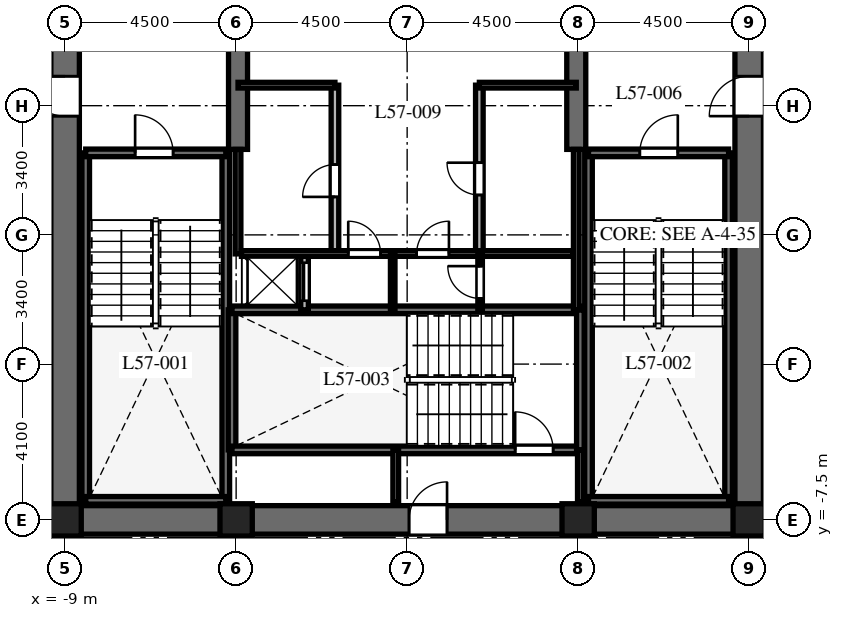
"""IFC4 building model, lengths in metres.
Left out: names, types, materials, properties, quantities, classifications, styles, units other than length and angle.
Written with IfcOpenShell. Run it as: python <this file> out.ifc"""

import sys

from ifc_helpers import new_model, si_unit, direction, frame, frame_2d, origin, origin_2d, place, context, subcontext, project, spatial, rectangle, extrude, element, fill, save


model = new_model("IFC4")
c1 = context("Model", 3, precision=1e-05, world=origin(), true_north=direction((0.0, 1.0)))
c2 = subcontext(c1, "Body", "Model", "MODEL_VIEW")
j1 = project(units=[si_unit("LENGTHUNIT", "METRE"), si_unit("PLANEANGLEUNIT", "RADIAN")], contexts=[c1])
p1 = place(None, origin())
s1 = spatial("IfcSite", under=j1, at=p1, CompositionType="ELEMENT")
p2 = place(p1, origin())
s2 = spatial("IfcBuilding", under=s1, at=p2, CompositionType="ELEMENT")
p3 = place(p2, frame((0.0, 0.0, 229.3)))
s3 = spatial("IfcBuildingStorey", under=s2, at=p3, CompositionType="ELEMENT", Elevation=229.3)
p4 = place(p3, frame((-9.375, -7.5, 0.0), z_axis=(0.0, 0.0, 1.0), x_axis=(1.0, 0.0, 0.0)))
e1 = element("IfcWall", 1, at=p4, inside=s3, PredefinedType="SHEAR", context=c2, shape_type="SweptSolid", body=[
    extrude(rectangle(XDim=18.75, YDim=0.75, at=frame_2d((9.375, 0.0))), origin(), (0.0, 0.0, 1.0), 3.8),
])
p5 = place(p4, frame((9.425, 0.0, 0.0)))
e2 = element("IfcOpeningElement", 2, at=p5, cuts=e1, PredefinedType="OPENING", context=c2, shape_type="SweptSolid", body=[
    extrude(rectangle(XDim=1.0, YDim=2.15, at=frame_2d((0.5, 1.075))), frame((0.0, 0.385, 0.0), z_axis=(0.0, -1.0, 0.0), x_axis=(1.0, 0.0, 0.0)), (0.0, 0.0, 1.0), 0.77),
])
p6 = place(p3, frame((-9.0, -7.125, 0.0), z_axis=(0.0, 0.0, 1.0), x_axis=(0.0, 1.0, 0.0)))
e3 = element("IfcWall", 3, at=p6, inside=s3, PredefinedType="SHEAR", context=c2, shape_type="SweptSolid", body=[
    extrude(rectangle(XDim=14.25, YDim=0.75, at=frame_2d((7.125, 0.0))), origin(), (0.0, 0.0, 1.0), 3.8),
])
p7 = place(p6, frame((10.25, 0.0, 0.0)))
e4 = element("IfcOpeningElement", 4, at=p7, cuts=e3, PredefinedType="OPENING", context=c2, shape_type="SweptSolid", body=[
    extrude(rectangle(XDim=1.05, YDim=2.15, at=frame_2d((0.525, 1.075))), frame((0.0, 0.385, 0.0), z_axis=(0.0, -1.0, 0.0), x_axis=(1.0, 0.0, 0.0)), (0.0, 0.0, 1.0), 0.77),
])
p8 = place(p3, frame((9.0, -7.125, 0.0), z_axis=(0.0, 0.0, 1.0), x_axis=(0.0, 1.0, 0.0)))
e5 = element("IfcWall", 5, at=p8, inside=s3, PredefinedType="SHEAR", context=c2, shape_type="SweptSolid", body=[
    extrude(rectangle(XDim=14.25, YDim=0.75, at=frame_2d((7.125, 0.0))), origin(), (0.0, 0.0, 1.0), 3.8),
])
p9 = place(p8, frame((10.25, 0.0, 0.0)))
e6 = element("IfcOpeningElement", 6, at=p9, cuts=e5, PredefinedType="OPENING", context=c2, shape_type="SweptSolid", body=[
    extrude(rectangle(XDim=1.05, YDim=2.15, at=frame_2d((0.525, 1.075))), frame((0.0, 0.385, 0.0), z_axis=(0.0, -1.0, 0.0), x_axis=(1.0, 0.0, 0.0)), (0.0, 0.0, 1.0), 0.77),
])
for number, where, z_axis, x_axis in (
    (7, (-4.45, 2.25, 0.0), (0.0, 0.0, 1.0), (0.0, 1.0, 0.0)),
    (8, (4.45, 2.25, 0.0), (0.0, 0.0, 1.0), (0.0, 1.0, 0.0)),
):
    element("IfcWall", number, at=place(p3, frame(where, z_axis=z_axis, x_axis=x_axis)), inside=s3, PredefinedType="SHEAR", context=c2, shape_type="SweptSolid", body=[
        extrude(rectangle(XDim=4.875, YDim=0.5, at=frame_2d((2.438, 0.0))), origin(), (0.0, 0.0, 1.0), 3.8),
    ])
for number, where, z_axis, x_axis in (
    (9, (-8.458, -6.985, 0.0), (0.0, 0.0, 1.0), (0.0, 1.0, 0.0)),
    (10, (-4.772, -6.985, 0.0), (0.0, 0.0, 1.0), (0.0, 1.0, 0.0)),
):
    element("IfcWall", number, at=place(p3, frame(where, z_axis=z_axis, x_axis=x_axis)), inside=s3, PredefinedType="SHEAR", context=c2, shape_type="SweptSolid", body=[
        extrude(rectangle(XDim=9.143, YDim=0.2, at=frame_2d((4.572, 0.0))), origin(), (0.0, 0.0, 1.0), 3.8),
    ])
p10 = place(p3, frame((-8.458, -6.985, 0.0), z_axis=(0.0, 0.0, 1.0), x_axis=(1.0, 0.0, 0.0)))
e11 = element("IfcWall", 11, at=p10, inside=s3, PredefinedType="SHEAR", context=c2, shape_type="SweptSolid", body=[
    extrude(rectangle(XDim=3.686, YDim=0.2, at=frame_2d((1.843, 0.0))), origin(), (0.0, 0.0, 1.0), 3.8),
])
p11 = place(p3, frame((-8.458, 2.158, 0.0), z_axis=(0.0, 0.0, 1.0), x_axis=(1.0, 0.0, 0.0)))
e12 = element("IfcWall", 12, at=p11, inside=s3, PredefinedType="SHEAR", context=c2, shape_type="SweptSolid", body=[
    extrude(rectangle(XDim=3.686, YDim=0.2, at=frame_2d((1.843, 0.0))), origin(), (0.0, 0.0, 1.0), 3.8),
])
p12 = place(p11, frame((1.3, 0.0, 0.0)))
e13 = element("IfcOpeningElement", 13, at=p12, cuts=e12, PredefinedType="OPENING", context=c2, shape_type="SweptSolid", body=[
    extrude(rectangle(XDim=1.0, YDim=2.15, at=frame_2d((0.5, 1.075))), frame((0.0, 0.11, 0.0), z_axis=(0.0, -1.0, 0.0), x_axis=(1.0, 0.0, 0.0)), (0.0, 0.0, 1.0), 0.22),
])
for number, where, z_axis, x_axis in (
    (14, (4.772, -6.985, 0.0), (0.0, 0.0, 1.0), (0.0, 1.0, 0.0)),
    (15, (8.458, -6.985, 0.0), (0.0, 0.0, 1.0), (0.0, 1.0, 0.0)),
):
    element("IfcWall", number, at=place(p3, frame(where, z_axis=z_axis, x_axis=x_axis)), inside=s3, PredefinedType="SHEAR", context=c2, shape_type="SweptSolid", body=[
        extrude(rectangle(XDim=9.143, YDim=0.2, at=frame_2d((4.572, 0.0))), origin(), (0.0, 0.0, 1.0), 3.8),
    ])
p13 = place(p3, frame((4.772, -6.985, 0.0), z_axis=(0.0, 0.0, 1.0), x_axis=(1.0, 0.0, 0.0)))
e16 = element("IfcWall", 16, at=p13, inside=s3, PredefinedType="SHEAR", context=c2, shape_type="SweptSolid", body=[
    extrude(rectangle(XDim=3.686, YDim=0.2, at=frame_2d((1.843, 0.0))), origin(), (0.0, 0.0, 1.0), 3.8),
])
p14 = place(p3, frame((4.772, 2.158, 0.0), z_axis=(0.0, 0.0, 1.0), x_axis=(1.0, 0.0, 0.0)))
e17 = element("IfcWall", 17, at=p14, inside=s3, PredefinedType="SHEAR", context=c2, shape_type="SweptSolid", body=[
    extrude(rectangle(XDim=3.686, YDim=0.2, at=frame_2d((1.843, 0.0))), origin(), (0.0, 0.0, 1.0), 3.8),
])
p15 = place(p14, frame((1.35, 0.0, 0.0)))
e18 = element("IfcOpeningElement", 18, at=p15, cuts=e17, PredefinedType="OPENING", context=c2, shape_type="SweptSolid", body=[
    extrude(rectangle(XDim=1.0, YDim=2.15, at=frame_2d((0.5, 1.075))), frame((0.0, 0.11, 0.0), z_axis=(0.0, -1.0, 0.0), x_axis=(1.0, 0.0, 0.0)), (0.0, 0.0, 1.0), 0.22),
])
p16 = place(p3, frame((-4.608, -5.658, 0.0), z_axis=(0.0, 0.0, 1.0), x_axis=(0.0, 1.0, 0.0)))
e19 = element("IfcWall", 19, at=p16, inside=s3, PredefinedType="SHEAR", context=c2, shape_type="SweptSolid", body=[
    extrude(rectangle(XDim=3.686, YDim=0.2, at=frame_2d((1.843, 0.0))), origin(), (0.0, 0.0, 1.0), 3.8),
])
p17 = place(p3, frame((-4.608, -5.658, 0.0), z_axis=(0.0, 0.0, 1.0), x_axis=(1.0, 0.0, 0.0)))
e20 = element("IfcWall", 20, at=p17, inside=s3, PredefinedType="SHEAR", context=c2, shape_type="SweptSolid", body=[
    extrude(rectangle(XDim=9.166, YDim=0.2, at=frame_2d((4.583, 0.0))), origin(), (0.0, 0.0, 1.0), 3.8),
])
p18 = place(p17, frame((7.45, 0.0, 0.0)))
e21 = element("IfcOpeningElement", 21, at=p18, cuts=e20, PredefinedType="OPENING", context=c2, shape_type="SweptSolid", body=[
    extrude(rectangle(XDim=1.0, YDim=2.15, at=frame_2d((0.5, 1.075))), frame((0.0, 0.11, 0.0), z_axis=(0.0, -1.0, 0.0), x_axis=(1.0, 0.0, 0.0)), (0.0, 0.0, 1.0), 0.22),
])
p19 = place(p3, frame((-4.608, -1.972, 0.0), z_axis=(0.0, 0.0, 1.0), x_axis=(1.0, 0.0, 0.0)))
e22 = element("IfcWall", 22, at=p19, inside=s3, PredefinedType="SHEAR", context=c2, shape_type="SweptSolid", body=[
    extrude(rectangle(XDim=9.166, YDim=0.2, at=frame_2d((4.583, 0.0))), origin(), (0.0, 0.0, 1.0), 3.8),
])
p20 = place(p3, frame((4.558, -5.658, 0.0), z_axis=(0.0, 0.0, 1.0), x_axis=(0.0, 1.0, 0.0)))
e23 = element("IfcWall", 23, at=p20, inside=s3, PredefinedType="SHEAR", context=c2, shape_type="SweptSolid", body=[
    extrude(rectangle(XDim=3.686, YDim=0.2, at=frame_2d((1.843, 0.0))), origin(), (0.0, 0.0, 1.0), 3.8),
])
for number, where, z_axis, x_axis in (
    (24, (-9.0, -7.5, 0.0), (0.0, 0.0, 1.0), (1.0, 0.0, 0.0)),
    (25, (-4.5, -7.5, 0.0), (0.0, 0.0, 1.0), (1.0, 0.0, 0.0)),
    (26, (4.5, -7.5, 0.0), (0.0, 0.0, 1.0), (1.0, 0.0, 0.0)),
    (27, (9.0, -7.5, 0.0), (0.0, 0.0, 1.0), (1.0, 0.0, 0.0)),
):
    element("IfcColumn", number, at=place(p3, frame(where, z_axis=z_axis, x_axis=x_axis)), inside=s3, PredefinedType="COLUMN", context=c2, shape_type="SweptSolid", body=[
        extrude(rectangle(XDim=0.85, YDim=0.85, at=origin_2d()), origin(), (0.0, 0.0, 1.0), 3.8),
    ])
for number, where, z_axis, x_axis in (
    (28, (-0.3, -7.02, 0.0), (0.0, 0.0, 1.0), (0.0, 1.0, 0.0)),
    (29, (4.558, -7.02, 0.0), (0.0, 0.0, 1.0), (0.0, 1.0, 0.0)),
):
    element("IfcWall", number, at=place(p3, frame(where, z_axis=z_axis, x_axis=x_axis)), inside=s3, PredefinedType="PARTITIONING", context=c2, shape_type="SweptSolid", body=[
        extrude(rectangle(XDim=1.362, YDim=0.15, at=frame_2d((0.681, 0.0))), origin(), (0.0, 0.0, 1.0), 3.5),
    ])
p21 = place(p3, frame((-2.7, -1.972, 0.0), z_axis=(0.0, 0.0, 1.0), x_axis=(0.0, 1.0, 0.0)))
e30 = element("IfcWall", 30, at=p21, inside=s3, PredefinedType="PARTITIONING", context=c2, shape_type="SweptSolid", body=[
    extrude(rectangle(XDim=1.472, YDim=0.2, at=frame_2d((0.736, 0.0))), origin(), (0.0, 0.0, 1.0), 3.5),
])
p22 = place(p21, frame((0.24, 0.0, 0.0)))
e31 = element("IfcOpeningElement", 31, at=p22, cuts=e30, PredefinedType="OPENING", context=c2, shape_type="SweptSolid", body=[
    extrude(rectangle(XDim=1.0, YDim=2.2, at=frame_2d((0.5, 1.1))), frame((0.0, 0.11, 0.0), z_axis=(0.0, -1.0, 0.0), x_axis=(1.0, 0.0, 0.0)), (0.0, 0.0, 1.0), 0.22),
])
p23 = place(p3, frame((-4.45, -0.5, 0.0), z_axis=(0.0, 0.0, 1.0), x_axis=(0.0, 1.0, 0.0)))
e32 = element("IfcWall", 32, at=p23, inside=s3, PredefinedType="PARTITIONING", context=c2, shape_type="SweptSolid", body=[
    extrude(rectangle(XDim=2.75, YDim=0.15, at=frame_2d((1.375, 0.0))), origin(), (0.0, 0.0, 1.0), 3.5),
])
p24 = place(p3, frame((4.45, -1.972, 0.0), z_axis=(0.0, 0.0, 1.0), x_axis=(0.0, 1.0, 0.0)))
e33 = element("IfcWall", 33, at=p24, inside=s3, PredefinedType="PARTITIONING", context=c2, shape_type="SweptSolid", body=[
    extrude(rectangle(XDim=4.222, YDim=0.15, at=frame_2d((2.111, 0.0))), origin(), (0.0, 0.0, 1.0), 3.5),
])
p25 = place(p3, frame((-1.9, -0.5, 0.0), z_axis=(0.0, 0.0, 1.0), x_axis=(0.0, 1.0, 0.0)))
e34 = element("IfcWall", 34, at=p25, inside=s3, PredefinedType="PARTITIONING", context=c2, shape_type="SweptSolid", body=[
    extrude(rectangle(XDim=4.44, YDim=0.2, at=frame_2d((2.22, 0.0))), origin(), (0.0, 0.0, 1.0), 3.5),
])
p26 = place(p25, frame((1.5, 0.0, 0.0)))
e35 = element("IfcOpeningElement", 35, at=p26, cuts=e34, PredefinedType="OPENING", context=c2, shape_type="SweptSolid", body=[
    extrude(rectangle(XDim=0.85, YDim=2.03, at=frame_2d((0.425, 1.015))), frame((0.0, 0.11, 0.0), z_axis=(0.0, -1.0, 0.0), x_axis=(1.0, 0.0, 0.0)), (0.0, 0.0, 1.0), 0.22),
])
p27 = place(p3, frame((-4.45, 3.94, 0.0), z_axis=(0.0, 0.0, 1.0), x_axis=(1.0, 0.0, 0.0)))
e36 = element("IfcWall", 36, at=p27, inside=s3, PredefinedType="PARTITIONING", context=c2, shape_type="SweptSolid", body=[
    extrude(rectangle(XDim=2.55, YDim=0.15, at=frame_2d((1.275, 0.0))), origin(), (0.0, 0.0, 1.0), 3.5),
])
p28 = place(p3, frame((1.9, -0.5, 0.0), z_axis=(0.0, 0.0, 1.0), x_axis=(0.0, 1.0, 0.0)))
e37 = element("IfcWall", 37, at=p28, inside=s3, PredefinedType="PARTITIONING", context=c2, shape_type="SweptSolid", body=[
    extrude(rectangle(XDim=4.44, YDim=0.2, at=frame_2d((2.22, 0.0))), origin(), (0.0, 0.0, 1.0), 3.5),
])
p29 = place(p28, frame((1.55, 0.0, 0.0)))
e38 = element("IfcOpeningElement", 38, at=p29, cuts=e37, PredefinedType="OPENING", context=c2, shape_type="SweptSolid", body=[
    extrude(rectangle(XDim=0.85, YDim=2.03, at=frame_2d((0.425, 1.015))), frame((0.0, 0.11, 0.0), z_axis=(0.0, -1.0, 0.0), x_axis=(1.0, 0.0, 0.0)), (0.0, 0.0, 1.0), 0.22),
])
p30 = place(p3, frame((1.9, 3.94, 0.0), z_axis=(0.0, 0.0, 1.0), x_axis=(1.0, 0.0, 0.0)))
e39 = element("IfcWall", 39, at=p30, inside=s3, PredefinedType="PARTITIONING", context=c2, shape_type="SweptSolid", body=[
    extrude(rectangle(XDim=2.55, YDim=0.15, at=frame_2d((1.275, 0.0))), origin(), (0.0, 0.0, 1.0), 3.5),
])
p31 = place(p3, frame((-4.36, -0.49, 0.0), z_axis=(0.0, 0.0, 1.0), x_axis=(1.0, 0.0, 0.0)))
e40 = element("IfcWall", 40, at=p31, inside=s3, PredefinedType="PARTITIONING", context=c2, shape_type="SweptSolid", body=[
    extrude(rectangle(XDim=8.72, YDim=0.15, at=frame_2d((4.36, 0.0))), origin(), (0.0, 0.0, 1.0), 3.5),
])
p32 = place(p31, frame((2.81, 0.0, 0.0)))
e41 = element("IfcOpeningElement", 41, at=p32, cuts=e40, PredefinedType="OPENING", context=c2, shape_type="SweptSolid", body=[
    extrude(rectangle(XDim=0.85, YDim=2.03, at=frame_2d((0.425, 1.015))), frame((0.0, 0.085, 0.0), z_axis=(0.0, -1.0, 0.0), x_axis=(1.0, 0.0, 0.0)), (0.0, 0.0, 1.0), 0.17),
])
p33 = place(p31, frame((4.61, 0.0, 0.0)))
e42 = element("IfcOpeningElement", 42, at=p33, cuts=e40, PredefinedType="OPENING", context=c2, shape_type="SweptSolid", body=[
    extrude(rectangle(XDim=0.85, YDim=2.03, at=frame_2d((0.425, 1.015))), frame((0.0, 0.085, 0.0), z_axis=(0.0, -1.0, 0.0), x_axis=(1.0, 0.0, 0.0)), (0.0, 0.0, 1.0), 0.17),
])
p34 = place(p3, frame((-0.38, -1.972, 0.0), z_axis=(0.0, 0.0, 1.0), x_axis=(0.0, 1.0, 0.0)))
e43 = element("IfcWall", 43, at=p34, inside=s3, PredefinedType="PARTITIONING", context=c2, shape_type="SweptSolid", body=[
    extrude(rectangle(XDim=1.472, YDim=0.12, at=frame_2d((0.736, 0.0))), origin(), (0.0, 0.0, 1.0), 3.5),
])
p35 = place(p3, frame((1.92, -1.972, 0.0), z_axis=(0.0, 0.0, 1.0), x_axis=(0.0, 1.0, 0.0)))
e44 = element("IfcWall", 44, at=p35, inside=s3, PredefinedType="PARTITIONING", context=c2, shape_type="SweptSolid", body=[
    extrude(rectangle(XDim=1.472, YDim=0.12, at=frame_2d((0.736, 0.0))), origin(), (0.0, 0.0, 1.0), 3.5),
])
p36 = place(p35, frame((0.3, 0.0, 0.0)))
e45 = element("IfcOpeningElement", 45, at=p36, cuts=e44, PredefinedType="OPENING", context=c2, shape_type="SweptSolid", body=[
    extrude(rectangle(XDim=0.85, YDim=2.03, at=frame_2d((0.425, 1.015))), frame((0.0, 0.07, 0.0), z_axis=(0.0, -1.0, 0.0), x_axis=(1.0, 0.0, 0.0)), (0.0, 0.0, 1.0), 0.14),
])
p37 = place(p12, origin())
e46 = element("IfcDoor", 46, at=p37, inside=s3, OperationType="SINGLE_SWING_LEFT", PredefinedType="DOOR", context=c2, shape_type="SweptSolid", body=[
    extrude(rectangle(XDim=1.0, YDim=2.15, at=frame_2d((0.5, 1.075))), frame((0.0, 0.025, 0.0), z_axis=(0.0, -1.0, 0.0), x_axis=(1.0, 0.0, 0.0)), (0.0, 0.0, 1.0), 0.05),
])
fill(e13, e46)
p38 = place(p15, origin())
e47 = element("IfcDoor", 47, at=p38, inside=s3, OperationType="SINGLE_SWING_RIGHT", PredefinedType="DOOR", context=c2, shape_type="SweptSolid", body=[
    extrude(rectangle(XDim=1.0, YDim=2.15, at=frame_2d((0.5, 1.075))), frame((0.0, 0.025, 0.0), z_axis=(0.0, -1.0, 0.0), x_axis=(1.0, 0.0, 0.0)), (0.0, 0.0, 1.0), 0.05),
])
fill(e18, e47)
p39 = place(p18, origin())
e48 = element("IfcDoor", 48, at=p39, inside=s3, OperationType="SINGLE_SWING_LEFT", PredefinedType="DOOR", context=c2, shape_type="SweptSolid", body=[
    extrude(rectangle(XDim=1.0, YDim=2.15, at=frame_2d((0.5, 1.075))), frame((0.0, 0.025, 0.0), z_axis=(0.0, -1.0, 0.0), x_axis=(1.0, 0.0, 0.0)), (0.0, 0.0, 1.0), 0.05),
])
fill(e21, e48)
p40 = place(p5, origin())
e49 = element("IfcDoor", 49, at=p40, inside=s3, OperationType="SINGLE_SWING_RIGHT", PredefinedType="DOOR", context=c2, shape_type="SweptSolid", body=[
    extrude(rectangle(XDim=1.0, YDim=2.15, at=frame_2d((0.5, 1.075))), frame((0.0, 0.025, 0.0), z_axis=(0.0, -1.0, 0.0), x_axis=(1.0, 0.0, 0.0)), (0.0, 0.0, 1.0), 0.05),
])
fill(e2, e49)
p41 = place(p7, origin())
e50 = element("IfcDoor", 50, at=p41, inside=s3, OperationType="SINGLE_SWING_RIGHT", PredefinedType="DOOR", context=c2, shape_type="SweptSolid", body=[
    extrude(rectangle(XDim=1.05, YDim=2.15, at=frame_2d((0.525, 1.075))), frame((0.0, 0.025, 0.0), z_axis=(0.0, -1.0, 0.0), x_axis=(1.0, 0.0, 0.0)), (0.0, 0.0, 1.0), 0.05),
])
fill(e4, e50)
p42 = place(p9, origin())
e51 = element("IfcDoor", 51, at=p42, inside=s3, OperationType="SINGLE_SWING_LEFT", PredefinedType="DOOR", context=c2, shape_type="SweptSolid", body=[
    extrude(rectangle(XDim=1.05, YDim=2.15, at=frame_2d((0.525, 1.075))), frame((0.0, 0.025, 0.0), z_axis=(0.0, -1.0, 0.0), x_axis=(1.0, 0.0, 0.0)), (0.0, 0.0, 1.0), 0.05),
])
fill(e6, e51)
p43 = place(p22, origin())
e52 = element("IfcDoor", 52, at=p43, inside=s3, OperationType="SLIDING_TO_LEFT", PredefinedType="DOOR", context=c2, shape_type="SweptSolid", body=[
    extrude(rectangle(XDim=1.0, YDim=2.2, at=frame_2d((0.5, 1.1))), frame((0.0, 0.025, 0.0), z_axis=(0.0, -1.0, 0.0), x_axis=(1.0, 0.0, 0.0)), (0.0, 0.0, 1.0), 0.05),
])
fill(e31, e52)
p44 = place(p26, origin())
e53 = element("IfcDoor", 53, at=p44, inside=s3, OperationType="SINGLE_SWING_LEFT", PredefinedType="DOOR", context=c2, shape_type="SweptSolid", body=[
    extrude(rectangle(XDim=0.85, YDim=2.03, at=frame_2d((0.425, 1.015))), frame((0.0, 0.025, 0.0), z_axis=(0.0, -1.0, 0.0), x_axis=(1.0, 0.0, 0.0)), (0.0, 0.0, 1.0), 0.05),
])
fill(e35, e53)
p45 = place(p29, origin())
e54 = element("IfcDoor", 54, at=p45, inside=s3, OperationType="SINGLE_SWING_RIGHT", PredefinedType="DOOR", context=c2, shape_type="SweptSolid", body=[
    extrude(rectangle(XDim=0.85, YDim=2.03, at=frame_2d((0.425, 1.015))), frame((0.0, 0.025, 0.0), z_axis=(0.0, -1.0, 0.0), x_axis=(1.0, 0.0, 0.0)), (0.0, 0.0, 1.0), 0.05),
])
fill(e38, e54)
p46 = place(p32, origin())
e55 = element("IfcDoor", 55, at=p46, inside=s3, OperationType="SINGLE_SWING_LEFT", PredefinedType="DOOR", context=c2, shape_type="SweptSolid", body=[
    extrude(rectangle(XDim=0.85, YDim=2.03, at=frame_2d((0.425, 1.015))), frame((0.0, 0.025, 0.0), z_axis=(0.0, -1.0, 0.0), x_axis=(1.0, 0.0, 0.0)), (0.0, 0.0, 1.0), 0.05),
])
fill(e41, e55)
p47 = place(p33, origin())
e56 = element("IfcDoor", 56, at=p47, inside=s3, OperationType="SINGLE_SWING_RIGHT", PredefinedType="DOOR", context=c2, shape_type="SweptSolid", body=[
    extrude(rectangle(XDim=0.85, YDim=2.03, at=frame_2d((0.425, 1.015))), frame((0.0, 0.025, 0.0), z_axis=(0.0, -1.0, 0.0), x_axis=(1.0, 0.0, 0.0)), (0.0, 0.0, 1.0), 0.05),
])
fill(e42, e56)
p48 = place(p36, origin())
e57 = element("IfcDoor", 57, at=p48, inside=s3, OperationType="SINGLE_SWING_RIGHT", PredefinedType="DOOR", context=c2, shape_type="SweptSolid", body=[
    extrude(rectangle(XDim=0.85, YDim=2.03, at=frame_2d((0.425, 1.015))), frame((0.0, 0.025, 0.0), z_axis=(0.0, -1.0, 0.0), x_axis=(1.0, 0.0, 0.0)), (0.0, 0.0, 1.0), 0.05),
])
fill(e45, e57)
save(model, sys.argv[1])
